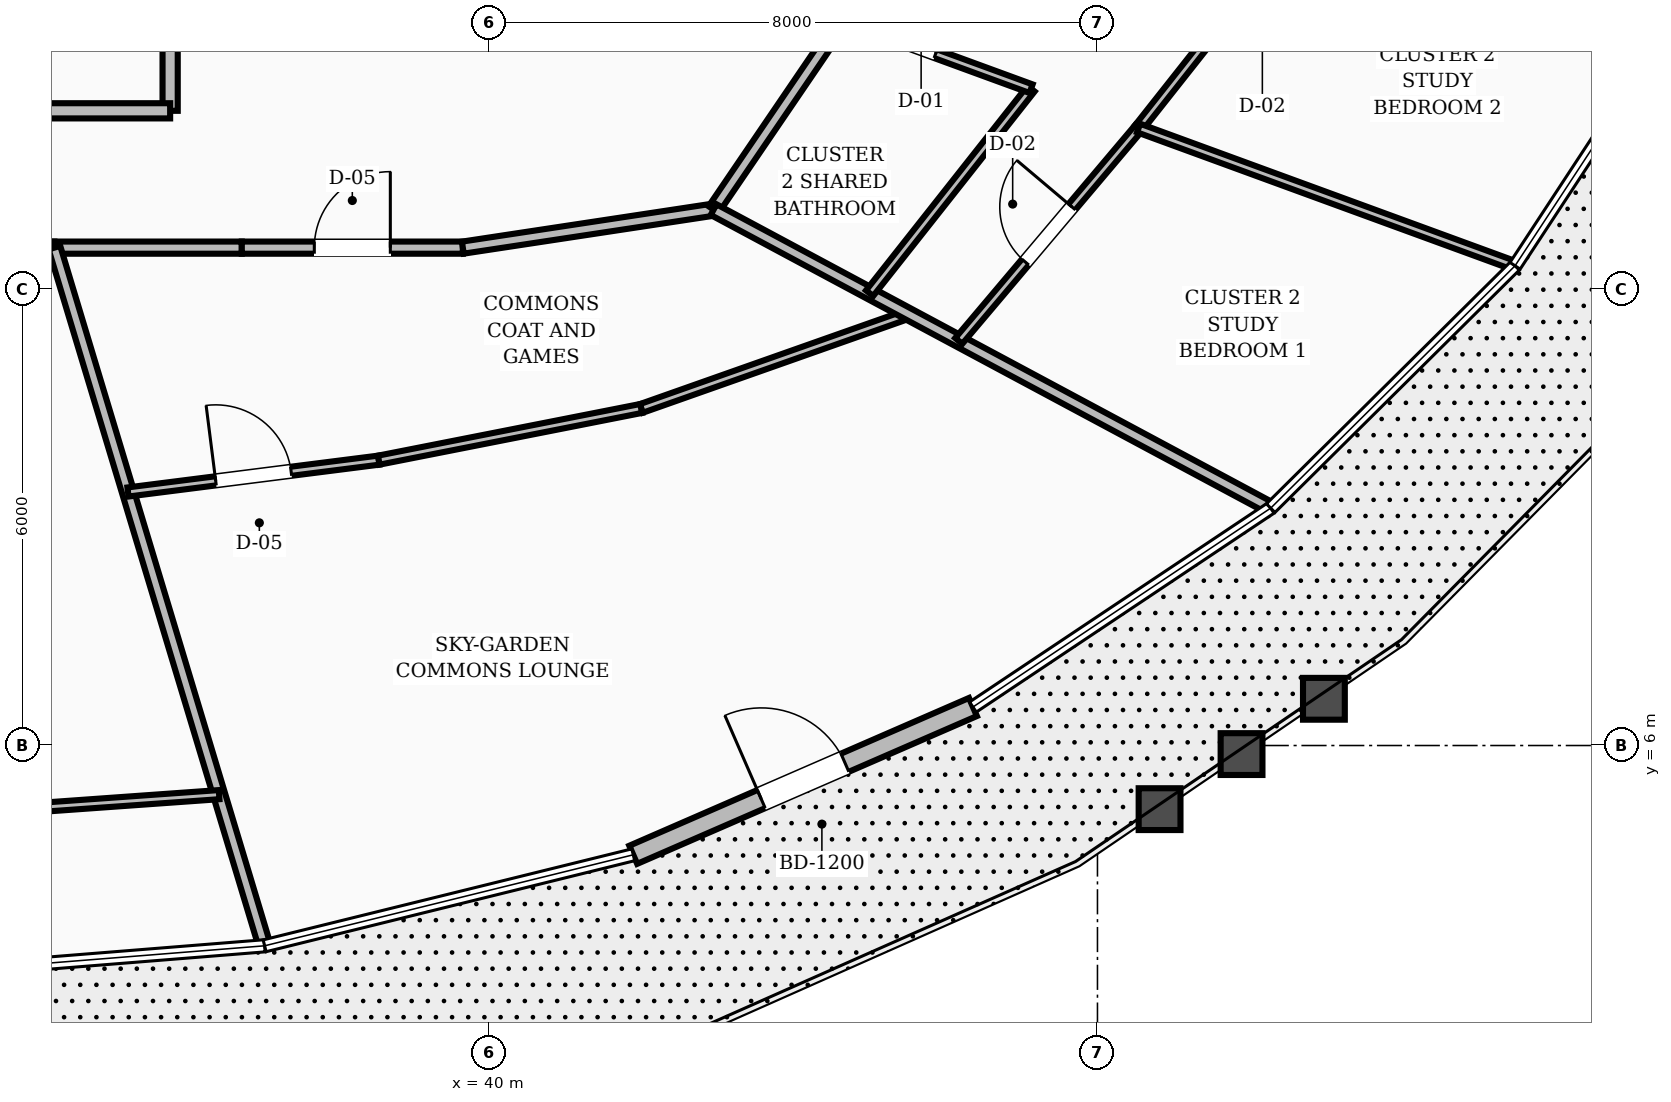
"""IFC4 building model, lengths in metres.
Left out: names, types, materials, properties, quantities, classifications, styles, units other than length and angle.
Written with IfcOpenShell. Run it as: python <this file> out.ifc"""

import sys

from ifc_helpers import new_model, si_unit, direction, frame, frame_2d, origin, place, context, subcontext, project, spatial, rectangle, extrude, element, fill, save


model = new_model("IFC4")
c1 = context("Model", 3, precision=1e-05, world=origin(), true_north=direction((0.0, 1.0)))
c2 = subcontext(c1, "Body", "Model", "MODEL_VIEW")
j1 = project(units=[si_unit("LENGTHUNIT", "METRE"), si_unit("PLANEANGLEUNIT", "RADIAN")], contexts=[c1])
p1 = place(None, origin())
s1 = spatial("IfcSite", under=j1, at=p1, CompositionType="ELEMENT")
p2 = place(p1, origin())
s2 = spatial("IfcBuilding", under=s1, at=p2, CompositionType="ELEMENT")
p3 = place(p2, frame((0.0, 0.0, 146.0)))
s3 = spatial("IfcBuildingStorey", under=s2, at=p3, CompositionType="ELEMENT", Elevation=146.0)
p4 = place(p3, frame((41.893, 4.562, 0.0), z_axis=(0.0, 0.0, 1.0), x_axis=(0.916980839608, 0.398931246948, 0.0)))
e1 = element("IfcWall", 1, at=p4, inside=s3, PredefinedType="STANDARD", context=c2, shape_type="SweptSolid", body=[
    extrude(rectangle(XDim=4.874, YDim=0.26, at=frame_2d((2.437, 0.0))), origin(), (0.0, 0.0, 1.0), 2.82),
])
p5 = place(p4, frame((1.837, 0.0, 0.0)))
e2 = element("IfcOpeningElement", 2, at=p5, cuts=e1, PredefinedType="OPENING", context=c2, shape_type="SweptSolid", body=[
    extrude(rectangle(XDim=1.2, YDim=2.15, at=frame_2d((0.6, 1.075))), frame((0.0, 0.14, 0.0), z_axis=(0.0, -1.0, 0.0), x_axis=(1.0, 0.0, 0.0)), (0.0, 0.0, 1.0), 0.28),
])
p6 = place(p3, frame((35.8, 14.35, 0.0), z_axis=(0.0, 0.0, 1.0), x_axis=(0.0, 1.0, 0.0)))
e3 = element("IfcWall", 3, at=p6, inside=s3, PredefinedType="SOLIDWALL", context=c2, shape_type="SweptSolid", body=[
    extrude(rectangle(XDim=2.2, YDim=0.2, at=frame_2d((1.1, 0.0))), origin(), (0.0, 0.0, 1.0), 2.8),
])
p7 = place(p3, frame((28.2, 14.35, 0.0), z_axis=(0.0, 0.0, 1.0), x_axis=(1.0, 0.0, 0.0)))
e4 = element("IfcWall", 4, at=p7, inside=s3, PredefinedType="SOLIDWALL", context=c2, shape_type="SweptSolid", body=[
    extrude(rectangle(XDim=7.6, YDim=0.2, at=frame_2d((3.8, 0.0))), origin(), (0.0, 0.0, 1.0), 2.8),
])
p8 = place(p7, frame((3.2, 0.0, 0.0)))
e5 = element("IfcOpeningElement", 5, at=p8, cuts=e4, PredefinedType="OPENING", context=c2, shape_type="SweptSolid", body=[
    extrude(rectangle(XDim=1.2, YDim=2.1, at=frame_2d((0.6, 1.05))), frame((0.0, 0.11, 0.0), z_axis=(0.0, -1.0, 0.0), x_axis=(1.0, 0.0, 0.0)), (0.0, 0.0, 1.0), 0.22),
])
p9 = place(p3, frame((32.0, 12.55, 0.0), z_axis=(0.0, 0.0, 1.0), x_axis=(1.0, 0.0, 0.0)))
e6 = element("IfcWall", 6, at=p9, inside=s3, PredefinedType="SOLIDWALL", context=c2, shape_type="SweptSolid", body=[
    extrude(rectangle(XDim=2.278, YDim=0.16, at=frame_2d((1.139, 0.0))), origin(), (0.0, 0.0, 1.0), 2.8),
])
p10 = place(p9, frame((0.664, 0.0, 0.0)))
e7 = element("IfcOpeningElement", 7, at=p10, cuts=e6, PredefinedType="OPENING", context=c2, shape_type="SweptSolid", body=[
    extrude(rectangle(XDim=0.95, YDim=2.1, at=frame_2d((0.475, 1.05))), frame((0.0, 0.09, 0.0), z_axis=(0.0, -1.0, 0.0), x_axis=(1.0, 0.0, 0.0)), (0.0, 0.0, 1.0), 0.18),
])
p11 = place(p3, frame((34.278, 12.55, 0.0), z_axis=(0.0, 0.0, 1.0), x_axis=(1.0, 0.0, 0.0)))
e8 = element("IfcWall", 8, at=p11, inside=s3, PredefinedType="SOLIDWALL", context=c2, shape_type="SweptSolid", body=[
    extrude(rectangle(XDim=2.465, YDim=0.16, at=frame_2d((1.232, 0.0))), origin(), (0.0, 0.0, 1.0), 2.8),
])
p12 = place(p3, frame((36.743, 12.55, 0.0), z_axis=(0.0, 0.0, 1.0), x_axis=(1.0, 0.0, 0.0)))
e9 = element("IfcWall", 9, at=p12, inside=s3, PredefinedType="SOLIDWALL", context=c2, shape_type="SweptSolid", body=[
    extrude(rectangle(XDim=2.908, YDim=0.16, at=frame_2d((1.454, 0.0))), origin(), (0.0, 0.0, 1.0), 2.8),
])
p13 = place(p12, frame((0.954, 0.0, 0.0)))
e10 = element("IfcOpeningElement", 10, at=p13, cuts=e9, PredefinedType="OPENING", context=c2, shape_type="SweptSolid", body=[
    extrude(rectangle(XDim=1.0, YDim=2.1, at=frame_2d((0.5, 1.05))), frame((0.0, 0.09, 0.0), z_axis=(0.0, -1.0, 0.0), x_axis=(1.0, 0.0, 0.0)), (0.0, 0.0, 1.0), 0.18),
])
p14 = place(p3, frame((39.651, 12.55, 0.0), z_axis=(0.0, 0.0, 1.0), x_axis=(0.988710906508, 0.149835721217, 0.0)))
e11 = element("IfcWall", 11, at=p14, inside=s3, PredefinedType="SOLIDWALL", context=c2, shape_type="SweptSolid", body=[
    extrude(rectangle(XDim=3.337, YDim=0.16, at=frame_2d((1.668, 0.0))), origin(), (0.0, 0.0, 1.0), 2.8),
])
p15 = place(p3, frame((42.95, 13.05, 0.0), z_axis=(0.0, 0.0, 1.0), x_axis=(0.562674669208, 0.826678423955, 0.0)))
e12 = element("IfcWall", 12, at=p15, inside=s3, PredefinedType="SOLIDWALL", context=c2, shape_type="SweptSolid", body=[
    extrude(rectangle(XDim=3.021, YDim=0.16, at=frame_2d((1.511, 0.0))), origin(), (0.0, 0.0, 1.0), 2.8),
])
p16 = place(p3, frame((34.278, 12.55, 0.0), z_axis=(0.0, 0.0, 1.0), x_axis=(0.28831479655, -0.9575356798, 0.0)))
e13 = element("IfcWall", 13, at=p16, inside=s3, PredefinedType="SOLIDWALL", context=c2, shape_type="SweptSolid", body=[
    extrude(rectangle(XDim=9.542, YDim=0.16, at=frame_2d((4.771, 0.0))), origin(), (0.0, 0.0, 1.0), 2.8),
])
p17 = place(p3, frame((35.246, 9.335, 0.0), z_axis=(0.0, 0.0, 1.0), x_axis=(0.992026301768, 0.126031014438, 0.0)))
e14 = element("IfcWall", 14, at=p17, inside=s3, PredefinedType="PARTITIONING", context=c2, shape_type="SweptSolid", body=[
    extrude(rectangle(XDim=3.326, YDim=0.12, at=frame_2d((1.663, 0.0))), origin(), (0.0, 0.0, 1.0), 2.8),
])
p18 = place(p17, frame((1.163, 0.0, 0.0)))
e15 = element("IfcOpeningElement", 15, at=p18, cuts=e14, PredefinedType="OPENING", context=c2, shape_type="SweptSolid", body=[
    extrude(rectangle(XDim=1.0, YDim=2.1, at=frame_2d((0.5, 1.05))), frame((0.0, 0.07, 0.0), z_axis=(0.0, -1.0, 0.0), x_axis=(1.0, 0.0, 0.0)), (0.0, 0.0, 1.0), 0.14),
])
p19 = place(p3, frame((38.545, 9.754, 0.0), z_axis=(0.0, 0.0, 1.0), x_axis=(0.981147276933, 0.193261535148, 0.0)))
e16 = element("IfcWall", 16, at=p19, inside=s3, PredefinedType="PARTITIONING", context=c2, shape_type="SweptSolid", body=[
    extrude(rectangle(XDim=3.521, YDim=0.12, at=frame_2d((1.76, 0.0))), origin(), (0.0, 0.0, 1.0), 2.8),
])
p20 = place(p3, frame((42.0, 10.435, 0.0), z_axis=(0.0, 0.0, 1.0), x_axis=(0.942997587187, 0.332799565145, 0.0)))
e17 = element("IfcWall", 17, at=p20, inside=s3, PredefinedType="PARTITIONING", context=c2, shape_type="SweptSolid", body=[
    extrude(rectangle(XDim=3.728, YDim=0.12, at=frame_2d((1.864, 0.0))), origin(), (0.0, 0.0, 1.0), 2.8),
])
p21 = place(p3, frame((42.95, 13.05, 0.0), z_axis=(0.0, 0.0, 1.0), x_axis=(0.881439566777, -0.472296824169, 0.0)))
e18 = element("IfcWall", 18, at=p21, inside=s3, PredefinedType="SOLIDWALL", context=c2, shape_type="SweptSolid", body=[
    extrude(rectangle(XDim=8.265, YDim=0.16, at=frame_2d((4.133, 0.0))), origin(), (0.0, 0.0, 1.0), 2.8),
])
p22 = place(p3, frame((45.002, 11.95, 0.0), z_axis=(0.0, 0.0, 1.0), x_axis=(0.619575015098, 0.784937450162, 0.0)))
e19 = element("IfcWall", 19, at=p22, inside=s3, PredefinedType="PARTITIONING", context=c2, shape_type="SweptSolid", body=[
    extrude(rectangle(XDim=3.428, YDim=0.12, at=frame_2d((1.714, 0.0))), origin(), (0.0, 0.0, 1.0), 2.8),
])
p23 = place(p3, frame((44.65, 15.548, 0.0), z_axis=(0.0, 0.0, 1.0), x_axis=(0.93908860173, -0.343675134538, 0.0)))
e20 = element("IfcWall", 20, at=p23, inside=s3, PredefinedType="PARTITIONING", context=c2, shape_type="SweptSolid", body=[
    extrude(rectangle(XDim=2.637, YDim=0.12, at=frame_2d((1.318, 0.0))), origin(), (0.0, 0.0, 1.0), 2.8),
])
p24 = place(p23, frame((0.44, 0.0, 0.0)))
e21 = element("IfcOpeningElement", 21, at=p24, cuts=e20, PredefinedType="OPENING", context=c2, shape_type="SweptSolid", body=[
    extrude(rectangle(XDim=0.86, YDim=2.1, at=frame_2d((0.43, 1.05))), frame((0.0, 0.07, 0.0), z_axis=(0.0, -1.0, 0.0), x_axis=(1.0, 0.0, 0.0)), (0.0, 0.0, 1.0), 0.14),
])
p25 = place(p3, frame((46.175, 11.322, 0.0), z_axis=(0.0, 0.0, 1.0), x_axis=(0.645297395585, 0.763931457169, 0.0)))
e22 = element("IfcWall", 22, at=p25, inside=s3, PredefinedType="PARTITIONING", context=c2, shape_type="SweptSolid", body=[
    extrude(rectangle(XDim=3.667, YDim=0.12, at=frame_2d((1.833, 0.0))), origin(), (0.0, 0.0, 1.0), 2.8),
])
p26 = place(p25, frame((1.359, 0.0, 0.0)))
e23 = element("IfcOpeningElement", 23, at=p26, cuts=e22, PredefinedType="OPENING", context=c2, shape_type="SweptSolid", body=[
    extrude(rectangle(XDim=0.95, YDim=2.1, at=frame_2d((0.475, 1.05))), frame((0.0, 0.07, 0.0), z_axis=(0.0, -1.0, 0.0), x_axis=(1.0, 0.0, 0.0)), (0.0, 0.0, 1.0), 0.14),
])
p27 = place(p3, frame((48.541, 14.124, 0.0), z_axis=(0.0, 0.0, 1.0), x_axis=(0.620026847561, 0.784580593887, 0.0)))
e24 = element("IfcWall", 24, at=p27, inside=s3, PredefinedType="PARTITIONING", context=c2, shape_type="SweptSolid", body=[
    extrude(rectangle(XDim=3.682, YDim=0.12, at=frame_2d((1.841, 0.0))), origin(), (0.0, 0.0, 1.0), 2.8),
])
p28 = place(p27, frame((1.366, 0.0, 0.0)))
e25 = element("IfcOpeningElement", 25, at=p28, cuts=e24, PredefinedType="OPENING", context=c2, shape_type="SweptSolid", body=[
    extrude(rectangle(XDim=0.95, YDim=2.1, at=frame_2d((0.475, 1.05))), frame((0.0, 0.07, 0.0), z_axis=(0.0, -1.0, 0.0), x_axis=(1.0, 0.0, 0.0)), (0.0, 0.0, 1.0), 0.14),
])
p29 = place(p3, frame((48.541, 14.124, 0.0), z_axis=(0.0, 0.0, 1.0), x_axis=(0.939099678482, -0.343644865924, 0.0)))
e26 = element("IfcWall", 26, at=p29, inside=s3, PredefinedType="PARTITIONING", context=c2, shape_type="SweptSolid", body=[
    extrude(rectangle(XDim=5.224, YDim=0.12, at=frame_2d((2.612, 0.0))), origin(), (0.0, 0.0, 1.0), 2.8),
])
p30 = place(p3, frame((32.0, 5.037, 0.0), z_axis=(0.0, 0.0, 1.0), x_axis=(0.997467592574, 0.071122442055, 0.0)))
e27 = element("IfcWall", 27, at=p30, inside=s3, PredefinedType="PARTITIONING", context=c2, shape_type="SweptSolid", body=[
    extrude(rectangle(XDim=4.456, YDim=0.12, at=frame_2d((2.228, 0.0))), origin(), (0.0, 0.0, 1.0), 2.8),
])
p31 = place(p5, origin())
e28 = element("IfcDoor", 28, at=p31, inside=s3, OperationType="SINGLE_SWING_LEFT", PredefinedType="DOOR", context=c2, shape_type="SweptSolid", body=[
    extrude(rectangle(XDim=1.2, YDim=2.15, at=frame_2d((0.6, 1.075))), frame((0.0, 0.025, 0.0), z_axis=(0.0, -1.0, 0.0), x_axis=(1.0, 0.0, 0.0)), (0.0, 0.0, 1.0), 0.05),
])
fill(e2, e28)
p32 = place(p13, origin())
e29 = element("IfcDoor", 29, at=p32, inside=s3, OperationType="SINGLE_SWING_RIGHT", PredefinedType="DOOR", context=c2, shape_type="SweptSolid", body=[
    extrude(rectangle(XDim=1.0, YDim=2.1, at=frame_2d((0.5, 1.05))), frame((0.0, 0.025, 0.0), z_axis=(0.0, -1.0, 0.0), x_axis=(1.0, 0.0, 0.0)), (0.0, 0.0, 1.0), 0.05),
])
fill(e10, e29)
p33 = place(p18, origin())
e30 = element("IfcDoor", 30, at=p33, inside=s3, OperationType="SINGLE_SWING_LEFT", PredefinedType="DOOR", context=c2, shape_type="SweptSolid", body=[
    extrude(rectangle(XDim=1.0, YDim=2.1, at=frame_2d((0.5, 1.05))), frame((0.0, 0.025, 0.0), z_axis=(0.0, -1.0, 0.0), x_axis=(1.0, 0.0, 0.0)), (0.0, 0.0, 1.0), 0.05),
])
fill(e15, e30)
p34 = place(p24, origin())
e31 = element("IfcDoor", 31, at=p34, inside=s3, OperationType="SINGLE_SWING_RIGHT", PredefinedType="DOOR", context=c2, shape_type="SweptSolid", body=[
    extrude(rectangle(XDim=0.86, YDim=2.1, at=frame_2d((0.43, 1.05))), frame((0.0, 0.025, 0.0), z_axis=(0.0, -1.0, 0.0), x_axis=(1.0, 0.0, 0.0)), (0.0, 0.0, 1.0), 0.05),
])
fill(e21, e31)
p35 = place(p26, origin())
e32 = element("IfcDoor", 32, at=p35, inside=s3, OperationType="SINGLE_SWING_RIGHT", PredefinedType="DOOR", context=c2, shape_type="SweptSolid", body=[
    extrude(rectangle(XDim=0.95, YDim=2.1, at=frame_2d((0.475, 1.05))), frame((0.0, 0.025, 0.0), z_axis=(0.0, -1.0, 0.0), x_axis=(1.0, 0.0, 0.0)), (0.0, 0.0, 1.0), 0.05),
])
fill(e23, e32)
save(model, sys.argv[1])
